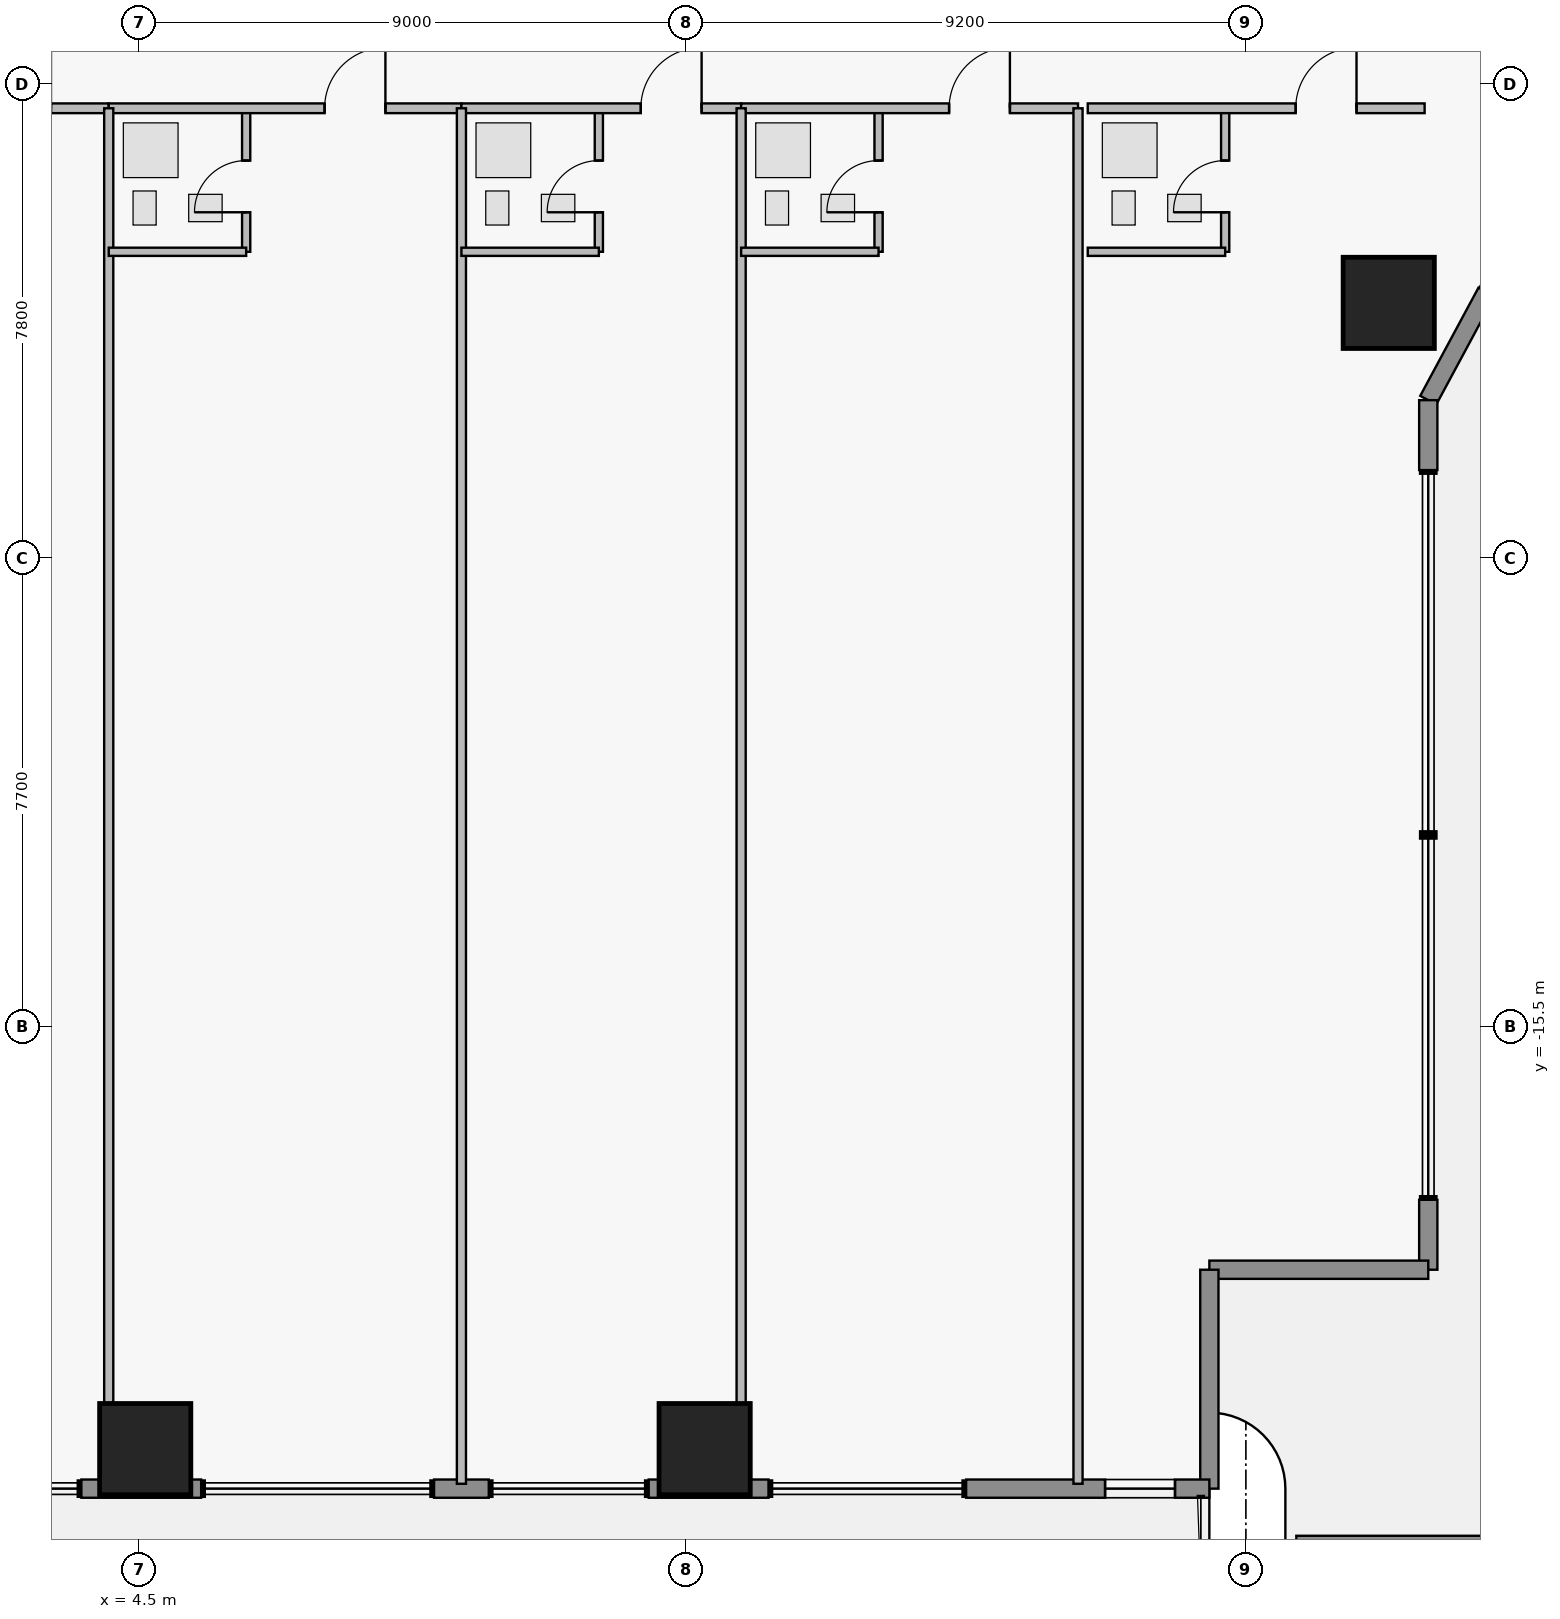
"""IFC4 building model, lengths in metres.
Left out: names, types, materials, properties, quantities, classifications, styles, units other than length and angle.
Written with IfcOpenShell. Run it as: python <this file> out.ifc"""

import sys

from ifc_helpers import new_model, si_unit, direction, frame, frame_2d, origin, origin_2d, place, context, subcontext, project, spatial, rectangle, extrude, element, fill, save


model = new_model("IFC4")
c1 = context("Model", 3, precision=1e-05, world=origin(), true_north=direction((0.0, 1.0)))
c2 = subcontext(c1, "Body", "Model", "MODEL_VIEW")
j1 = project(units=[si_unit("LENGTHUNIT", "METRE"), si_unit("PLANEANGLEUNIT", "RADIAN")], contexts=[c1])
p1 = place(None, origin())
s1 = spatial("IfcSite", under=j1, at=p1, CompositionType="ELEMENT")
p2 = place(p1, origin())
s2 = spatial("IfcBuilding", under=s1, at=p2, CompositionType="ELEMENT")
p3 = place(p2, frame((0.0, 0.0, 27.6)))
s3 = spatial("IfcBuildingStorey", under=s2, at=p3, CompositionType="ELEMENT", Elevation=27.6)
for number, where, z_axis, x_axis in (
    (1, (4.6, -22.45, 0.0), (0.0, 0.0, 1.0), (1.0, 0.0, 0.0)),
    (2, (13.8, -22.45, 0.0), (0.0, 0.0, 1.0), (1.0, 0.0, 0.0)),
    (3, (25.05, -3.6, 0.0), (0.0, 0.0, 1.0), (1.0, 0.0, 0.0)),
):
    element("IfcColumn", number, at=place(p3, frame(where, z_axis=z_axis, x_axis=x_axis)), inside=s3, PredefinedType="COLUMN", context=c2, shape_type="SweptSolid", body=[
        extrude(rectangle(XDim=1.5, YDim=1.5, at=origin_2d()), origin(), (0.0, 0.0, 1.0), 3.65),
    ])
p4 = place(p3, frame((31.82, -24.0, 0.0), z_axis=(0.0, 0.0, 1.0), x_axis=(-1.0, 0.0, 0.0)))
e4 = element("IfcWall", 4, at=p4, inside=s3, PredefinedType="PARAPET", context=c2, shape_type="SweptSolid", body=[
    extrude(rectangle(XDim=8.29, YDim=0.25, at=frame_2d((4.145, 0.0))), origin(), (0.0, 0.0, 1.0), 1.15),
])
p5 = place(p3, frame((25.7, 5.2, 0.0), z_axis=(0.0, 0.0, 1.0), x_axis=(0.474109683532, -0.880465790352, 0.0)))
e5 = element("IfcWall", 5, at=p5, inside=s3, PredefinedType="STANDARD", context=c2, shape_type="SweptSolid", body=[
    extrude(rectangle(XDim=5.906, YDim=0.3, at=frame_2d((2.953, 0.0))), origin(), (0.0, 0.0, 1.0), 3.43),
])
p6 = place(p5, frame((2.324, 0.0, 0.95)))
e6 = element("IfcOpeningElement", 6, at=p6, cuts=e5, PredefinedType="OPENING", context=c2, shape_type="SweptSolid", body=[
    extrude(rectangle(XDim=1.15, YDim=1.55, at=frame_2d((0.575, 0.775))), frame((0.0, 0.16, 0.0), z_axis=(0.0, -1.0, 0.0), x_axis=(1.0, 0.0, 0.0)), (0.0, 0.0, 1.0), 0.32),
])
p7 = place(p3, frame((26.658, -3.421, 0.0), z_axis=(0.0, 0.0, 1.0), x_axis=(-0.474121438562, -0.88045946045, 0.0)))
e7 = element("IfcWall", 7, at=p7, inside=s3, PredefinedType="STANDARD", context=c2, shape_type="SweptSolid", body=[
    extrude(rectangle(XDim=2.021, YDim=0.3, at=frame_2d((1.01, 0.0))), origin(), (0.0, 0.0, 1.0), 3.43),
])
p8 = place(p3, frame((25.7, -5.2, 0.0), z_axis=(0.0, 0.0, 1.0), x_axis=(0.0, -1.0, 0.0)))
e8 = element("IfcWall", 8, at=p8, inside=s3, PredefinedType="STANDARD", context=c2, shape_type="SweptSolid", body=[
    extrude(rectangle(XDim=1.15, YDim=0.3, at=frame_2d((0.575, 0.0))), origin(), (0.0, 0.0, 1.0), 3.43),
])
p9 = place(p3, frame((25.7, -18.35, 0.0), z_axis=(0.0, 0.0, 1.0), x_axis=(0.0, -1.0, 0.0)))
e9 = element("IfcWall", 9, at=p9, inside=s3, PredefinedType="STANDARD", context=c2, shape_type="SweptSolid", body=[
    extrude(rectangle(XDim=1.15, YDim=0.3, at=frame_2d((0.575, 0.0))), origin(), (0.0, 0.0, 1.0), 3.43),
])
p10 = place(p3, frame((25.7, -19.5, 0.0), z_axis=(0.0, 0.0, 1.0), x_axis=(-1.0, 0.0, 0.0)))
e10 = element("IfcWall", 10, at=p10, inside=s3, PredefinedType="STANDARD", context=c2, shape_type="SweptSolid", body=[
    extrude(rectangle(XDim=3.6, YDim=0.3, at=frame_2d((1.8, 0.0))), origin(), (0.0, 0.0, 1.0), 3.43),
])
p11 = place(p3, frame((22.1, -19.5, 0.0), z_axis=(0.0, 0.0, 1.0), x_axis=(0.0, -1.0, 0.0)))
e11 = element("IfcWall", 11, at=p11, inside=s3, PredefinedType="STANDARD", context=c2, shape_type="SweptSolid", body=[
    extrude(rectangle(XDim=3.6, YDim=0.3, at=frame_2d((1.8, 0.0))), origin(), (0.0, 0.0, 1.0), 3.43),
])
p12 = place(p3, frame((22.1, -23.1, 0.0), z_axis=(0.0, 0.0, 1.0), x_axis=(-1.0, 0.0, 0.0)))
e12 = element("IfcWall", 12, at=p12, inside=s3, PredefinedType="STANDARD", context=c2, shape_type="SweptSolid", body=[
    extrude(rectangle(XDim=4.0, YDim=0.3, at=frame_2d((2.0, 0.0))), origin(), (0.0, 0.0, 1.0), 3.43),
])
p13 = place(p12, frame((0.565, 0.0, 0.95)))
e13 = element("IfcOpeningElement", 13, at=p13, cuts=e12, PredefinedType="OPENING", context=c2, shape_type="SweptSolid", body=[
    extrude(rectangle(XDim=1.15, YDim=1.55, at=frame_2d((0.575, 0.775))), frame((0.0, 0.16, 0.0), z_axis=(0.0, -1.0, 0.0), x_axis=(1.0, 0.0, 0.0)), (0.0, 0.0, 1.0), 0.32),
])
p14 = place(p3, frame((14.85, -23.1, 0.0), z_axis=(0.0, 0.0, 1.0), x_axis=(-1.0, 0.0, 0.0)))
e14 = element("IfcWall", 14, at=p14, inside=s3, PredefinedType="STANDARD", context=c2, shape_type="SweptSolid", body=[
    extrude(rectangle(XDim=1.97, YDim=0.3, at=frame_2d((0.985, 0.0))), origin(), (0.0, 0.0, 1.0), 3.43),
])
p15 = place(p3, frame((10.25, -23.1, 0.0), z_axis=(0.0, 0.0, 1.0), x_axis=(-1.0, 0.0, 0.0)))
e15 = element("IfcWall", 15, at=p15, inside=s3, PredefinedType="STANDARD", context=c2, shape_type="SweptSolid", body=[
    extrude(rectangle(XDim=0.9, YDim=0.3, at=frame_2d((0.45, 0.0))), origin(), (0.0, 0.0, 1.0), 3.43),
])
p16 = place(p3, frame((5.52, -23.1, 0.0), z_axis=(0.0, 0.0, 1.0), x_axis=(-1.0, 0.0, 0.0)))
e16 = element("IfcWall", 16, at=p16, inside=s3, PredefinedType="STANDARD", context=c2, shape_type="SweptSolid", body=[
    extrude(rectangle(XDim=1.97, YDim=0.3, at=frame_2d((0.985, 0.0))), origin(), (0.0, 0.0, 1.0), 3.43),
])
p17 = place(p3, frame((-1.2, -0.4, 0.0), z_axis=(0.0, 0.0, 1.0), x_axis=(1.0, 0.0, 0.0)))
e17 = element("IfcWall", 17, at=p17, inside=s3, PredefinedType="PARTITIONING", context=c2, shape_type="SweptSolid", body=[
    extrude(rectangle(XDim=5.2, YDim=0.16, at=frame_2d((2.6, 0.0))), origin(), (0.0, 0.0, 1.0), 3.43),
])
p18 = place(p17, frame((3.25, 0.0, 0.0)))
e18 = element("IfcOpeningElement", 18, at=p18, cuts=e17, PredefinedType="OPENING", context=c2, shape_type="SweptSolid", body=[
    extrude(rectangle(XDim=1.0, YDim=2.15, at=frame_2d((0.5, 1.075))), frame((0.0, 0.09, 0.0), z_axis=(0.0, -1.0, 0.0), x_axis=(1.0, 0.0, 0.0)), (0.0, 0.0, 1.0), 0.18),
])
p19 = place(p3, frame((6.26, -2.76, 0.0), z_axis=(0.0, 0.0, 1.0), x_axis=(0.0, 1.0, 0.0)))
e19 = element("IfcWall", 19, at=p19, inside=s3, PredefinedType="PLUMBINGWALL", context=c2, shape_type="SweptSolid", body=[
    extrude(rectangle(XDim=2.36, YDim=0.135, at=frame_2d((1.18, 0.0))), origin(), (0.0, 0.0, 1.0), 3.43),
])
p20 = place(p19, frame((0.65, 0.0, 0.0)))
e20 = element("IfcOpeningElement", 20, at=p20, cuts=e19, PredefinedType="OPENING", context=c2, shape_type="SweptSolid", body=[
    extrude(rectangle(XDim=0.85, YDim=2.1, at=frame_2d((0.425, 1.05))), frame((0.0, 0.077, 0.0), z_axis=(0.0, -1.0, 0.0), x_axis=(1.0, 0.0, 0.0)), (0.0, 0.0, 1.0), 0.155),
])
p21 = place(p3, frame((4.0, -0.4, 0.0), z_axis=(0.0, 0.0, 1.0), x_axis=(1.0, 0.0, 0.0)))
e21 = element("IfcWall", 21, at=p21, inside=s3, PredefinedType="PARTITIONING", context=c2, shape_type="SweptSolid", body=[
    extrude(rectangle(XDim=5.8, YDim=0.16, at=frame_2d((2.9, 0.0))), origin(), (0.0, 0.0, 1.0), 3.43),
])
p22 = place(p21, frame((3.55, 0.0, 0.0)))
e22 = element("IfcOpeningElement", 22, at=p22, cuts=e21, PredefinedType="OPENING", context=c2, shape_type="SweptSolid", body=[
    extrude(rectangle(XDim=1.0, YDim=2.15, at=frame_2d((0.5, 1.075))), frame((0.0, 0.09, 0.0), z_axis=(0.0, -1.0, 0.0), x_axis=(1.0, 0.0, 0.0)), (0.0, 0.0, 1.0), 0.18),
])
p23 = place(p3, frame((12.06, -2.76, 0.0), z_axis=(0.0, 0.0, 1.0), x_axis=(0.0, 1.0, 0.0)))
e23 = element("IfcWall", 23, at=p23, inside=s3, PredefinedType="PLUMBINGWALL", context=c2, shape_type="SweptSolid", body=[
    extrude(rectangle(XDim=2.36, YDim=0.135, at=frame_2d((1.18, 0.0))), origin(), (0.0, 0.0, 1.0), 3.43),
])
p24 = place(p23, frame((0.65, 0.0, 0.0)))
e24 = element("IfcOpeningElement", 24, at=p24, cuts=e23, PredefinedType="OPENING", context=c2, shape_type="SweptSolid", body=[
    extrude(rectangle(XDim=0.85, YDim=2.1, at=frame_2d((0.425, 1.05))), frame((0.0, 0.077, 0.0), z_axis=(0.0, -1.0, 0.0), x_axis=(1.0, 0.0, 0.0)), (0.0, 0.0, 1.0), 0.155),
])
p25 = place(p3, frame((9.8, -0.4, 0.0), z_axis=(0.0, 0.0, 1.0), x_axis=(1.0, 0.0, 0.0)))
e25 = element("IfcWall", 25, at=p25, inside=s3, PredefinedType="PARTITIONING", context=c2, shape_type="SweptSolid", body=[
    extrude(rectangle(XDim=4.6, YDim=0.16, at=frame_2d((2.3, 0.0))), origin(), (0.0, 0.0, 1.0), 3.43),
])
p26 = place(p25, frame((2.95, 0.0, 0.0)))
e26 = element("IfcOpeningElement", 26, at=p26, cuts=e25, PredefinedType="OPENING", context=c2, shape_type="SweptSolid", body=[
    extrude(rectangle(XDim=1.0, YDim=2.15, at=frame_2d((0.5, 1.075))), frame((0.0, 0.09, 0.0), z_axis=(0.0, -1.0, 0.0), x_axis=(1.0, 0.0, 0.0)), (0.0, 0.0, 1.0), 0.18),
])
p27 = place(p3, frame((16.66, -2.76, 0.0), z_axis=(0.0, 0.0, 1.0), x_axis=(0.0, 1.0, 0.0)))
e27 = element("IfcWall", 27, at=p27, inside=s3, PredefinedType="PLUMBINGWALL", context=c2, shape_type="SweptSolid", body=[
    extrude(rectangle(XDim=2.36, YDim=0.135, at=frame_2d((1.18, 0.0))), origin(), (0.0, 0.0, 1.0), 3.43),
])
p28 = place(p27, frame((0.65, 0.0, 0.0)))
e28 = element("IfcOpeningElement", 28, at=p28, cuts=e27, PredefinedType="OPENING", context=c2, shape_type="SweptSolid", body=[
    extrude(rectangle(XDim=0.85, YDim=2.1, at=frame_2d((0.425, 1.05))), frame((0.0, 0.077, 0.0), z_axis=(0.0, -1.0, 0.0), x_axis=(1.0, 0.0, 0.0)), (0.0, 0.0, 1.0), 0.155),
])
p29 = place(p3, frame((14.4, -0.4, 0.0), z_axis=(0.0, 0.0, 1.0), x_axis=(1.0, 0.0, 0.0)))
e29 = element("IfcWall", 29, at=p29, inside=s3, PredefinedType="PARTITIONING", context=c2, shape_type="SweptSolid", body=[
    extrude(rectangle(XDim=5.54, YDim=0.16, at=frame_2d((2.77, 0.0))), origin(), (0.0, 0.0, 1.0), 3.43),
])
p30 = place(p29, frame((3.42, 0.0, 0.0)))
e30 = element("IfcOpeningElement", 30, at=p30, cuts=e29, PredefinedType="OPENING", context=c2, shape_type="SweptSolid", body=[
    extrude(rectangle(XDim=1.0, YDim=2.15, at=frame_2d((0.5, 1.075))), frame((0.0, 0.09, 0.0), z_axis=(0.0, -1.0, 0.0), x_axis=(1.0, 0.0, 0.0)), (0.0, 0.0, 1.0), 0.18),
])
p31 = place(p3, frame((22.36, -2.76, 0.0), z_axis=(0.0, 0.0, 1.0), x_axis=(0.0, 1.0, 0.0)))
e31 = element("IfcWall", 31, at=p31, inside=s3, PredefinedType="PLUMBINGWALL", context=c2, shape_type="SweptSolid", body=[
    extrude(rectangle(XDim=2.36, YDim=0.135, at=frame_2d((1.18, 0.0))), origin(), (0.0, 0.0, 1.0), 3.43),
])
p32 = place(p31, frame((0.65, 0.0, 0.0)))
e32 = element("IfcOpeningElement", 32, at=p32, cuts=e31, PredefinedType="OPENING", context=c2, shape_type="SweptSolid", body=[
    extrude(rectangle(XDim=0.85, YDim=2.1, at=frame_2d((0.425, 1.05))), frame((0.0, 0.077, 0.0), z_axis=(0.0, -1.0, 0.0), x_axis=(1.0, 0.0, 0.0)), (0.0, 0.0, 1.0), 0.155),
])
p33 = place(p3, frame((20.1, -0.4, 0.0), z_axis=(0.0, 0.0, 1.0), x_axis=(1.0, 0.0, 0.0)))
e33 = element("IfcWall", 33, at=p33, inside=s3, PredefinedType="PARTITIONING", context=c2, shape_type="SweptSolid", body=[
    extrude(rectangle(XDim=5.54, YDim=0.16, at=frame_2d((2.77, 0.0))), origin(), (0.0, 0.0, 1.0), 3.43),
])
p34 = place(p33, frame((3.42, 0.0, 0.0)))
e34 = element("IfcOpeningElement", 34, at=p34, cuts=e33, PredefinedType="OPENING", context=c2, shape_type="SweptSolid", body=[
    extrude(rectangle(XDim=1.0, YDim=2.15, at=frame_2d((0.5, 1.075))), frame((0.0, 0.09, 0.0), z_axis=(0.0, -1.0, 0.0), x_axis=(1.0, 0.0, 0.0)), (0.0, 0.0, 1.0), 0.18),
])
p35 = place(p3, frame((4.0, -23.02, 0.0), z_axis=(0.0, 0.0, 1.0), x_axis=(0.0, 1.0, 0.0)))
e35 = element("IfcWall", 35, at=p35, inside=s3, PredefinedType="PARTITIONING", context=c2, shape_type="SweptSolid", body=[
    extrude(rectangle(XDim=22.62, YDim=0.15, at=frame_2d((11.31, 0.0))), origin(), (0.0, 0.0, 1.0), 3.43),
])
p36 = place(p3, frame((4.0, -2.76, 0.0), z_axis=(0.0, 0.0, 1.0), x_axis=(1.0, 0.0, 0.0)))
e36 = element("IfcWall", 36, at=p36, inside=s3, PredefinedType="PLUMBINGWALL", context=c2, shape_type="SweptSolid", body=[
    extrude(rectangle(XDim=2.26, YDim=0.135, at=frame_2d((1.13, 0.0))), origin(), (0.0, 0.0, 1.0), 3.43),
])
p37 = place(p3, frame((9.8, -23.02, 0.0), z_axis=(0.0, 0.0, 1.0), x_axis=(0.0, 1.0, 0.0)))
e37 = element("IfcWall", 37, at=p37, inside=s3, PredefinedType="PARTITIONING", context=c2, shape_type="SweptSolid", body=[
    extrude(rectangle(XDim=22.62, YDim=0.15, at=frame_2d((11.31, 0.0))), origin(), (0.0, 0.0, 1.0), 3.43),
])
p38 = place(p3, frame((9.8, -2.76, 0.0), z_axis=(0.0, 0.0, 1.0), x_axis=(1.0, 0.0, 0.0)))
e38 = element("IfcWall", 38, at=p38, inside=s3, PredefinedType="PLUMBINGWALL", context=c2, shape_type="SweptSolid", body=[
    extrude(rectangle(XDim=2.26, YDim=0.135, at=frame_2d((1.13, 0.0))), origin(), (0.0, 0.0, 1.0), 3.43),
])
p39 = place(p3, frame((14.4, -23.02, 0.0), z_axis=(0.0, 0.0, 1.0), x_axis=(0.0, 1.0, 0.0)))
e39 = element("IfcWall", 39, at=p39, inside=s3, PredefinedType="PARTITIONING", context=c2, shape_type="SweptSolid", body=[
    extrude(rectangle(XDim=22.62, YDim=0.15, at=frame_2d((11.31, 0.0))), origin(), (0.0, 0.0, 1.0), 3.43),
])
p40 = place(p3, frame((14.4, -2.76, 0.0), z_axis=(0.0, 0.0, 1.0), x_axis=(1.0, 0.0, 0.0)))
e40 = element("IfcWall", 40, at=p40, inside=s3, PredefinedType="PLUMBINGWALL", context=c2, shape_type="SweptSolid", body=[
    extrude(rectangle(XDim=2.26, YDim=0.135, at=frame_2d((1.13, 0.0))), origin(), (0.0, 0.0, 1.0), 3.43),
])
p41 = place(p3, frame((19.94, -23.02, 0.0), z_axis=(0.0, 0.0, 1.0), x_axis=(0.0, 1.0, 0.0)))
e41 = element("IfcWall", 41, at=p41, inside=s3, PredefinedType="PARTITIONING", context=c2, shape_type="SweptSolid", body=[
    extrude(rectangle(XDim=22.62, YDim=0.15, at=frame_2d((11.31, 0.0))), origin(), (0.0, 0.0, 1.0), 3.43),
])
p42 = place(p3, frame((20.1, -2.76, 0.0), z_axis=(0.0, 0.0, 1.0), x_axis=(1.0, 0.0, 0.0)))
e42 = element("IfcWall", 42, at=p42, inside=s3, PredefinedType="PLUMBINGWALL", context=c2, shape_type="SweptSolid", body=[
    extrude(rectangle(XDim=2.26, YDim=0.135, at=frame_2d((1.13, 0.0))), origin(), (0.0, 0.0, 1.0), 3.43),
])
p43 = place(p13, origin())
e43 = element("IfcWindow", 43, at=p43, inside=s3, PartitioningType="SINGLE_PANEL", PredefinedType="WINDOW", context=c2, shape_type="SweptSolid", body=[
    extrude(rectangle(XDim=1.15, YDim=1.55, at=frame_2d((0.575, 0.775))), frame((0.0, 0.03, 0.0), z_axis=(0.0, -1.0, 0.0), x_axis=(1.0, 0.0, 0.0)), (0.0, 0.0, 1.0), 0.06),
])
fill(e13, e43)
p44 = place(p20, origin())
e44 = element("IfcDoor", 44, at=p44, inside=s3, OperationType="SINGLE_SWING_LEFT", PredefinedType="DOOR", context=c2, shape_type="SweptSolid", body=[
    extrude(rectangle(XDim=0.85, YDim=2.1, at=frame_2d((0.425, 1.05))), frame((0.0, 0.025, 0.0), z_axis=(0.0, -1.0, 0.0), x_axis=(1.0, 0.0, 0.0)), (0.0, 0.0, 1.0), 0.05),
])
fill(e20, e44)
p45 = place(p22, origin())
e45 = element("IfcDoor", 45, at=p45, inside=s3, OperationType="SINGLE_SWING_RIGHT", PredefinedType="DOOR", context=c2, shape_type="SweptSolid", body=[
    extrude(rectangle(XDim=1.0, YDim=2.15, at=frame_2d((0.5, 1.075))), frame((0.0, 0.025, 0.0), z_axis=(0.0, -1.0, 0.0), x_axis=(1.0, 0.0, 0.0)), (0.0, 0.0, 1.0), 0.05),
])
fill(e22, e45)
p46 = place(p24, origin())
e46 = element("IfcDoor", 46, at=p46, inside=s3, OperationType="SINGLE_SWING_LEFT", PredefinedType="DOOR", context=c2, shape_type="SweptSolid", body=[
    extrude(rectangle(XDim=0.85, YDim=2.1, at=frame_2d((0.425, 1.05))), frame((0.0, 0.025, 0.0), z_axis=(0.0, -1.0, 0.0), x_axis=(1.0, 0.0, 0.0)), (0.0, 0.0, 1.0), 0.05),
])
fill(e24, e46)
p47 = place(p26, origin())
e47 = element("IfcDoor", 47, at=p47, inside=s3, OperationType="SINGLE_SWING_RIGHT", PredefinedType="DOOR", context=c2, shape_type="SweptSolid", body=[
    extrude(rectangle(XDim=1.0, YDim=2.15, at=frame_2d((0.5, 1.075))), frame((0.0, 0.025, 0.0), z_axis=(0.0, -1.0, 0.0), x_axis=(1.0, 0.0, 0.0)), (0.0, 0.0, 1.0), 0.05),
])
fill(e26, e47)
p48 = place(p28, origin())
e48 = element("IfcDoor", 48, at=p48, inside=s3, OperationType="SINGLE_SWING_LEFT", PredefinedType="DOOR", context=c2, shape_type="SweptSolid", body=[
    extrude(rectangle(XDim=0.85, YDim=2.1, at=frame_2d((0.425, 1.05))), frame((0.0, 0.025, 0.0), z_axis=(0.0, -1.0, 0.0), x_axis=(1.0, 0.0, 0.0)), (0.0, 0.0, 1.0), 0.05),
])
fill(e28, e48)
p49 = place(p30, origin())
e49 = element("IfcDoor", 49, at=p49, inside=s3, OperationType="SINGLE_SWING_RIGHT", PredefinedType="DOOR", context=c2, shape_type="SweptSolid", body=[
    extrude(rectangle(XDim=1.0, YDim=2.15, at=frame_2d((0.5, 1.075))), frame((0.0, 0.025, 0.0), z_axis=(0.0, -1.0, 0.0), x_axis=(1.0, 0.0, 0.0)), (0.0, 0.0, 1.0), 0.05),
])
fill(e30, e49)
p50 = place(p32, origin())
e50 = element("IfcDoor", 50, at=p50, inside=s3, OperationType="SINGLE_SWING_LEFT", PredefinedType="DOOR", context=c2, shape_type="SweptSolid", body=[
    extrude(rectangle(XDim=0.85, YDim=2.1, at=frame_2d((0.425, 1.05))), frame((0.0, 0.025, 0.0), z_axis=(0.0, -1.0, 0.0), x_axis=(1.0, 0.0, 0.0)), (0.0, 0.0, 1.0), 0.05),
])
fill(e32, e50)
p51 = place(p34, origin())
e51 = element("IfcDoor", 51, at=p51, inside=s3, OperationType="SINGLE_SWING_RIGHT", PredefinedType="DOOR", context=c2, shape_type="SweptSolid", body=[
    extrude(rectangle(XDim=1.0, YDim=2.15, at=frame_2d((0.5, 1.075))), frame((0.0, 0.025, 0.0), z_axis=(0.0, -1.0, 0.0), x_axis=(1.0, 0.0, 0.0)), (0.0, 0.0, 1.0), 0.05),
])
fill(e34, e51)
save(model, sys.argv[1])
